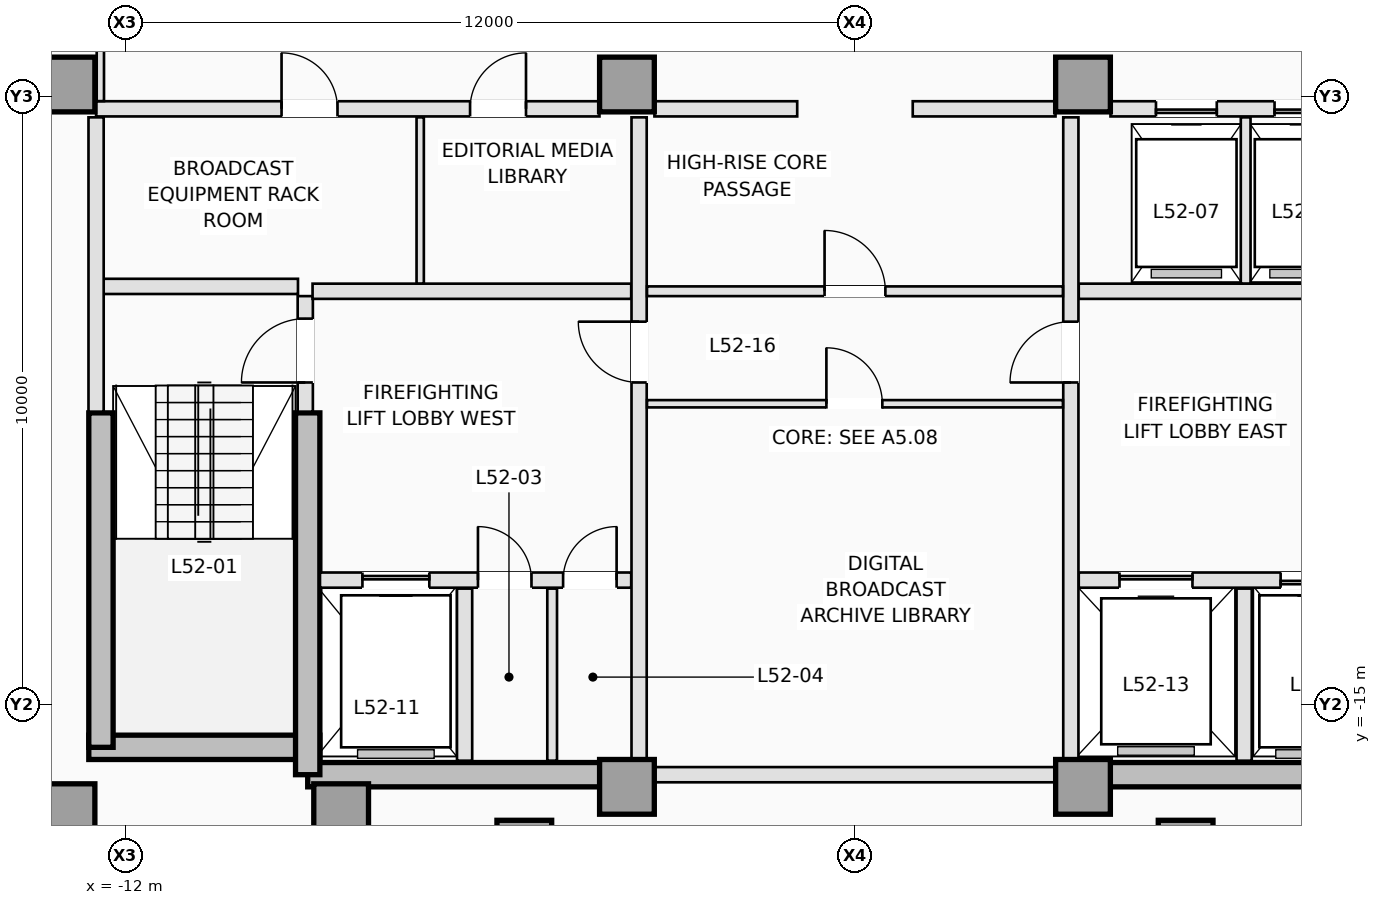
"""IFC4 building model, lengths in metres.
Left out: names, types, materials, properties, quantities, classifications, styles, units other than length and angle.
Written with IfcOpenShell. Run it as: python <this file> out.ifc"""

import sys

from ifc_helpers import new_model, si_unit, direction, frame, frame_2d, origin, origin_2d, place, context, subcontext, project, spatial, rectangle, extrude, element, fill, save


model = new_model("IFC4")
c1 = context("Model", 3, precision=1e-05, world=origin(), true_north=direction((0.0, 1.0)))
c2 = subcontext(c1, "Body", "Model", "MODEL_VIEW")
j1 = project(units=[si_unit("LENGTHUNIT", "METRE"), si_unit("PLANEANGLEUNIT", "RADIAN")], contexts=[c1])
p1 = place(None, origin())
s1 = spatial("IfcSite", under=j1, at=p1, CompositionType="ELEMENT")
p2 = place(p1, origin())
s2 = spatial("IfcBuilding", under=s1, at=p2, CompositionType="ELEMENT")
p3 = place(p2, frame((0.0, 0.0, 190.4)))
s3 = spatial("IfcBuildingStorey", under=s2, at=p3, CompositionType="ELEMENT", Elevation=190.4)
p4 = place(p3, frame((-12.6, -15.7, 0.0), z_axis=(0.0, 0.0, 1.0), x_axis=(1.0, 0.0, 0.0)))
e1 = element("IfcWall", 1, at=p4, inside=s3, PredefinedType="SHEAR", context=c2, shape_type="SweptSolid", body=[
    extrude(rectangle(XDim=3.8, YDim=0.4, at=frame_2d((1.9, 0.0))), origin(), (0.0, 0.0, 1.0), 3.5),
])
for number, where, z_axis, x_axis in (
    (2, (-9.0, -16.15, 0.0), (0.0, 0.0, 1.0), (1.0, 0.0, 0.0)),
    (3, (3.75, -16.15, 0.0), (0.0, 0.0, 1.0), (1.0, 0.0, 0.0)),
):
    element("IfcWall", number, at=place(p3, frame(where, z_axis=z_axis, x_axis=x_axis)), inside=s3, PredefinedType="SHEAR", context=c2, shape_type="SweptSolid", body=[
        extrude(rectangle(XDim=5.25, YDim=0.4, at=frame_2d((2.625, 0.0))), origin(), (0.0, 0.0, 1.0), 3.5),
    ])
p5 = place(p3, frame((-12.4, -15.7, 0.0), z_axis=(0.0, 0.0, 1.0), x_axis=(0.0, 1.0, 0.0)))
e4 = element("IfcWall", 4, at=p5, inside=s3, PredefinedType="SHEAR", context=c2, shape_type="SweptSolid", body=[
    extrude(rectangle(XDim=5.5, YDim=0.4, at=frame_2d((2.75, 0.0))), origin(), (0.0, 0.0, 1.0), 3.5),
])
p6 = place(p3, frame((-9.0, -16.15, 0.0), z_axis=(0.0, 0.0, 1.0), x_axis=(0.0, 1.0, 0.0)))
e5 = element("IfcWall", 5, at=p6, inside=s3, PredefinedType="SHEAR", context=c2, shape_type="SweptSolid", body=[
    extrude(rectangle(XDim=5.95, YDim=0.4, at=frame_2d((2.975, 0.0))), origin(), (0.0, 0.0, 1.0), 3.5),
])
for number, where, z_axis, x_axis in (
    (6, (-12.95, -16.75, 0.0), (0.0, 0.0, 1.0), (1.0, 0.0, 0.0)),
    (7, (-8.45, -16.75, 0.0), (0.0, 0.0, 1.0), (1.0, 0.0, 0.0)),
    (8, (-3.75, -16.35, 0.0), (0.0, 0.0, 1.0), (1.0, 0.0, 0.0)),
    (9, (3.75, -16.35, 0.0), (0.0, 0.0, 1.0), (1.0, 0.0, 0.0)),
    (10, (-12.95, -4.8, 0.0), (0.0, 0.0, 1.0), (1.0, 0.0, 0.0)),
    (11, (-3.75, -4.8, 0.0), (0.0, 0.0, 1.0), (1.0, 0.0, 0.0)),
    (12, (3.75, -4.8, 0.0), (0.0, 0.0, 1.0), (1.0, 0.0, 0.0)),
    (13, (-5.438, -17.35, 0.0), (0.0, 0.0, 1.0), (0.0, 1.0, 0.0)),
    (14, (5.438, -17.35, 0.0), (0.0, 0.0, 1.0), (0.0, 1.0, 0.0)),
):
    element("IfcColumn", number, at=place(p3, frame(where, z_axis=z_axis, x_axis=x_axis)), inside=s3, PredefinedType="COLUMN", context=c2, shape_type="SweptSolid", body=[
        extrude(rectangle(XDim=0.9, YDim=0.9, at=origin_2d()), origin(), (0.0, 0.0, 1.0), 3.5),
    ])
p7 = place(p3, frame((-9.04, -10.18, 0.0), z_axis=(0.0, 0.0, 1.0), x_axis=(0.0, 1.0, 0.0)))
e15 = element("IfcWall", 15, at=p7, inside=s3, PredefinedType="PARTITIONING", context=c2, shape_type="SweptSolid", body=[
    extrude(rectangle(XDim=1.9, YDim=0.25, at=frame_2d((0.95, 0.0))), origin(), (0.0, 0.0, 1.0), 3.25),
])
p8 = place(p7, frame((0.48, 0.0, 0.0)))
e16 = element("IfcOpeningElement", 16, at=p8, cuts=e15, PredefinedType="OPENING", context=c2, shape_type="SweptSolid", body=[
    extrude(rectangle(XDim=1.05, YDim=2.15, at=frame_2d((0.525, 1.075))), frame((0.0, 0.135, 0.0), z_axis=(0.0, -1.0, 0.0), x_axis=(1.0, 0.0, 0.0)), (0.0, 0.0, 1.0), 0.27),
])
p9 = place(p3, frame((-12.38, -8.12, 0.0), z_axis=(0.0, 0.0, 1.0), x_axis=(1.0, 0.0, 0.0)))
e17 = element("IfcWall", 17, at=p9, inside=s3, PredefinedType="PARTITIONING", context=c2, shape_type="SweptSolid", body=[
    extrude(rectangle(XDim=3.22, YDim=0.25, at=frame_2d((1.61, 0.0))), origin(), (0.0, 0.0, 1.0), 3.25),
])
p10 = place(p3, frame((-12.48, -10.18, 0.0), z_axis=(0.0, 0.0, 1.0), x_axis=(0.0, 1.0, 0.0)))
e18 = element("IfcWall", 18, at=p10, inside=s3, PredefinedType="PARTITIONING", context=c2, shape_type="SweptSolid", body=[
    extrude(rectangle(XDim=4.84, YDim=0.25, at=frame_2d((2.42, 0.0))), origin(), (0.0, 0.0, 1.0), 3.25),
])
p11 = place(p3, frame((-8.798, -12.95, 0.0), z_axis=(0.0, 0.0, 1.0), x_axis=(1.0, 0.0, 0.0)))
e19 = element("IfcWall", 19, at=p11, inside=s3, PredefinedType="PARTITIONING", context=c2, shape_type="SweptSolid", body=[
    extrude(rectangle(XDim=5.118, YDim=0.25, at=frame_2d((2.559, 0.0))), origin(), (0.0, 0.0, 1.0), 3.25),
])
p12 = place(p11, frame((0.698, 0.0, 0.0)))
e20 = element("IfcOpeningElement", 20, at=p12, cuts=e19, PredefinedType="OPENING", context=c2, shape_type="SweptSolid", body=[
    extrude(rectangle(XDim=1.1, YDim=2.15, at=frame_2d((0.55, 1.075))), frame((0.0, 0.135, 0.0), z_axis=(0.0, -1.0, 0.0), x_axis=(1.0, 0.0, 0.0)), (0.0, 0.0, 1.0), 0.27),
])
p13 = place(p11, frame((2.598, 0.0, 0.0)))
e21 = element("IfcOpeningElement", 21, at=p13, cuts=e19, PredefinedType="OPENING", context=c2, shape_type="SweptSolid", body=[
    extrude(rectangle(XDim=0.88, YDim=2.1, at=frame_2d((0.44, 1.05))), frame((0.0, 0.135, 0.0), z_axis=(0.0, -1.0, 0.0), x_axis=(1.0, 0.0, 0.0)), (0.0, 0.0, 1.0), 0.27),
])
p14 = place(p11, frame((3.998, 0.0, 0.0)))
e22 = element("IfcOpeningElement", 22, at=p14, cuts=e19, PredefinedType="OPENING", context=c2, shape_type="SweptSolid", body=[
    extrude(rectangle(XDim=0.88, YDim=2.1, at=frame_2d((0.44, 1.05))), frame((0.0, 0.135, 0.0), z_axis=(0.0, -1.0, 0.0), x_axis=(1.0, 0.0, 0.0)), (0.0, 0.0, 1.0), 0.27),
])
p15 = place(p3, frame((3.68, -12.95, 0.0), z_axis=(0.0, 0.0, 1.0), x_axis=(1.0, 0.0, 0.0)))
e23 = element("IfcWall", 23, at=p15, inside=s3, PredefinedType="PARTITIONING", context=c2, shape_type="SweptSolid", body=[
    extrude(rectangle(XDim=5.118, YDim=0.25, at=frame_2d((2.559, 0.0))), origin(), (0.0, 0.0, 1.0), 3.25),
])
p16 = place(p15, frame((3.32, 0.0, 0.0)))
e24 = element("IfcOpeningElement", 24, at=p16, cuts=e23, PredefinedType="OPENING", context=c2, shape_type="SweptSolid", body=[
    extrude(rectangle(XDim=1.1, YDim=2.15, at=frame_2d((0.55, 1.075))), frame((0.0, 0.135, 0.0), z_axis=(0.0, -1.0, 0.0), x_axis=(1.0, 0.0, 0.0)), (0.0, 0.0, 1.0), 0.27),
])
p17 = place(p15, frame((0.67, 0.0, 0.0)))
e25 = element("IfcOpeningElement", 25, at=p17, cuts=e23, PredefinedType="OPENING", context=c2, shape_type="SweptSolid", body=[
    extrude(rectangle(XDim=1.2, YDim=2.15, at=frame_2d((0.6, 1.075))), frame((0.0, 0.135, 0.0), z_axis=(0.0, -1.0, 0.0), x_axis=(1.0, 0.0, 0.0)), (0.0, 0.0, 1.0), 0.27),
])
p18 = place(p3, frame((-6.42, -15.92, 0.0), z_axis=(0.0, 0.0, 1.0), x_axis=(0.0, 1.0, 0.0)))
e26 = element("IfcWall", 26, at=p18, inside=s3, PredefinedType="PARTITIONING", context=c2, shape_type="SweptSolid", body=[
    extrude(rectangle(XDim=2.83, YDim=0.25, at=frame_2d((1.415, 0.0))), origin(), (0.0, 0.0, 1.0), 3.25),
])
p19 = place(p3, frame((-4.98, -15.92, 0.0), z_axis=(0.0, 0.0, 1.0), x_axis=(0.0, 1.0, 0.0)))
e27 = element("IfcWall", 27, at=p19, inside=s3, PredefinedType="PARTITIONING", context=c2, shape_type="SweptSolid", body=[
    extrude(rectangle(XDim=2.83, YDim=0.16, at=frame_2d((1.415, 0.0))), origin(), (0.0, 0.0, 1.0), 3.25),
])
p20 = place(p3, frame((6.4, -15.92, 0.0), z_axis=(0.0, 0.0, 1.0), x_axis=(0.0, 1.0, 0.0)))
e28 = element("IfcWall", 28, at=p20, inside=s3, PredefinedType="PARTITIONING", context=c2, shape_type="SweptSolid", body=[
    extrude(rectangle(XDim=2.83, YDim=0.25, at=frame_2d((1.415, 0.0))), origin(), (0.0, 0.0, 1.0), 3.25),
])
for number, where, z_axis, x_axis in (
    (29, (-8.92, -8.2, 0.0), (0.0, 0.0, 1.0), (1.0, 0.0, 0.0)),
    (30, (3.68, -8.2, 0.0), (0.0, 0.0, 1.0), (1.0, 0.0, 0.0)),
):
    element("IfcWall", number, at=place(p3, frame(where, z_axis=z_axis, x_axis=x_axis)), inside=s3, PredefinedType="PARTITIONING", context=c2, shape_type="SweptSolid", body=[
        extrude(rectangle(XDim=5.24, YDim=0.25, at=frame_2d((2.62, 0.0))), origin(), (0.0, 0.0, 1.0), 3.25),
    ])
p21 = place(p3, frame((-3.55, -15.898, 0.0), z_axis=(0.0, 0.0, 1.0), x_axis=(0.0, 1.0, 0.0)))
e31 = element("IfcWall", 31, at=p21, inside=s3, PredefinedType="PARTITIONING", context=c2, shape_type="SweptSolid", body=[
    extrude(rectangle(XDim=10.558, YDim=0.25, at=frame_2d((5.279, 0.0))), origin(), (0.0, 0.0, 1.0), 3.25),
])
p22 = place(p21, frame((6.198, 0.0, 0.0)))
e32 = element("IfcOpeningElement", 32, at=p22, cuts=e31, PredefinedType="OPENING", context=c2, shape_type="SweptSolid", body=[
    extrude(rectangle(XDim=1.0, YDim=2.15, at=frame_2d((0.5, 1.075))), frame((0.0, 0.135, 0.0), z_axis=(0.0, -1.0, 0.0), x_axis=(1.0, 0.0, 0.0)), (0.0, 0.0, 1.0), 0.27),
])
p23 = place(p3, frame((3.55, -15.898, 0.0), z_axis=(0.0, 0.0, 1.0), x_axis=(0.0, 1.0, 0.0)))
e33 = element("IfcWall", 33, at=p23, inside=s3, PredefinedType="PARTITIONING", context=c2, shape_type="SweptSolid", body=[
    extrude(rectangle(XDim=10.558, YDim=0.25, at=frame_2d((5.279, 0.0))), origin(), (0.0, 0.0, 1.0), 3.25),
])
p24 = place(p23, frame((6.198, 0.0, 0.0)))
e34 = element("IfcOpeningElement", 34, at=p24, cuts=e33, PredefinedType="OPENING", context=c2, shape_type="SweptSolid", body=[
    extrude(rectangle(XDim=1.0, YDim=2.15, at=frame_2d((0.5, 1.075))), frame((0.0, 0.135, 0.0), z_axis=(0.0, -1.0, 0.0), x_axis=(1.0, 0.0, 0.0)), (0.0, 0.0, 1.0), 0.27),
])
p25 = place(p3, frame((-12.48, -5.2, 0.0), z_axis=(0.0, 0.0, 1.0), x_axis=(1.0, 0.0, 0.0)))
e35 = element("IfcWall", 35, at=p25, inside=s3, PredefinedType="PARTITIONING", context=c2, shape_type="SweptSolid", body=[
    extrude(rectangle(XDim=8.278, YDim=0.25, at=frame_2d((4.139, 0.0))), origin(), (0.0, 0.0, 1.0), 3.25),
])
p26 = place(p25, frame((3.05, 0.0, 0.0)))
e36 = element("IfcOpeningElement", 36, at=p26, cuts=e35, PredefinedType="OPENING", context=c2, shape_type="SweptSolid", body=[
    extrude(rectangle(XDim=0.92, YDim=2.12, at=frame_2d((0.46, 1.06))), frame((0.0, 0.135, 0.0), z_axis=(0.0, -1.0, 0.0), x_axis=(1.0, 0.0, 0.0)), (0.0, 0.0, 1.0), 0.27),
])
p27 = place(p25, frame((6.15, 0.0, 0.0)))
e37 = element("IfcOpeningElement", 37, at=p27, cuts=e35, PredefinedType="OPENING", context=c2, shape_type="SweptSolid", body=[
    extrude(rectangle(XDim=0.92, YDim=2.12, at=frame_2d((0.46, 1.06))), frame((0.0, 0.135, 0.0), z_axis=(0.0, -1.0, 0.0), x_axis=(1.0, 0.0, 0.0)), (0.0, 0.0, 1.0), 0.27),
])
p28 = place(p3, frame((4.202, -5.2, 0.0), z_axis=(0.0, 0.0, 1.0), x_axis=(1.0, 0.0, 0.0)))
e38 = element("IfcWall", 38, at=p28, inside=s3, PredefinedType="PARTITIONING", context=c2, shape_type="SweptSolid", body=[
    extrude(rectangle(XDim=8.278, YDim=0.25, at=frame_2d((4.139, 0.0))), origin(), (0.0, 0.0, 1.0), 3.25),
])
p29 = place(p28, frame((0.748, 0.0, 0.0)))
e39 = element("IfcOpeningElement", 39, at=p29, cuts=e38, PredefinedType="OPENING", context=c2, shape_type="SweptSolid", body=[
    extrude(rectangle(XDim=1.0, YDim=2.15, at=frame_2d((0.5, 1.075))), frame((0.0, 0.135, 0.0), z_axis=(0.0, -1.0, 0.0), x_axis=(1.0, 0.0, 0.0)), (0.0, 0.0, 1.0), 0.27),
])
p30 = place(p28, frame((2.698, 0.0, 0.0)))
e40 = element("IfcOpeningElement", 40, at=p30, cuts=e38, PredefinedType="OPENING", context=c2, shape_type="SweptSolid", body=[
    extrude(rectangle(XDim=1.0, YDim=2.15, at=frame_2d((0.5, 1.075))), frame((0.0, 0.135, 0.0), z_axis=(0.0, -1.0, 0.0), x_axis=(1.0, 0.0, 0.0)), (0.0, 0.0, 1.0), 0.27),
])
p31 = place(p28, frame((4.648, 0.0, 0.0)))
e41 = element("IfcOpeningElement", 41, at=p31, cuts=e38, PredefinedType="OPENING", context=c2, shape_type="SweptSolid", body=[
    extrude(rectangle(XDim=1.0, YDim=2.15, at=frame_2d((0.5, 1.075))), frame((0.0, 0.135, 0.0), z_axis=(0.0, -1.0, 0.0), x_axis=(1.0, 0.0, 0.0)), (0.0, 0.0, 1.0), 0.27),
])
p32 = place(p28, frame((6.598, 0.0, 0.0)))
e42 = element("IfcOpeningElement", 42, at=p32, cuts=e38, PredefinedType="OPENING", context=c2, shape_type="SweptSolid", body=[
    extrude(rectangle(XDim=1.0, YDim=2.15, at=frame_2d((0.5, 1.075))), frame((0.0, 0.135, 0.0), z_axis=(0.0, -1.0, 0.0), x_axis=(1.0, 0.0, 0.0)), (0.0, 0.0, 1.0), 0.27),
])
for number, where, z_axis, x_axis in (
    (43, (-3.298, -5.2, 0.0), (0.0, 0.0, 1.0), (1.0, 0.0, 0.0)),
    (44, (0.95, -5.2, 0.0), (0.0, 0.0, 1.0), (1.0, 0.0, 0.0)),
):
    element("IfcWall", number, at=place(p3, frame(where, z_axis=z_axis, x_axis=x_axis)), inside=s3, PredefinedType="PARTITIONING", context=c2, shape_type="SweptSolid", body=[
        extrude(rectangle(XDim=2.348, YDim=0.25, at=frame_2d((1.174, 0.0))), origin(), (0.0, 0.0, 1.0), 3.25),
    ])
p33 = place(p3, frame((-7.15, -8.073, 0.0), z_axis=(0.0, 0.0, 1.0), x_axis=(0.0, 1.0, 0.0)))
e45 = element("IfcWall", 45, at=p33, inside=s3, PredefinedType="PARTITIONING", context=c2, shape_type="SweptSolid", body=[
    extrude(rectangle(XDim=2.733, YDim=0.12, at=frame_2d((1.366, 0.0))), origin(), (0.0, 0.0, 1.0), 3.25),
])
p34 = place(p3, frame((6.425, -8.073, 0.0), z_axis=(0.0, 0.0, 1.0), x_axis=(0.0, 1.0, 0.0)))
e46 = element("IfcWall", 46, at=p34, inside=s3, PredefinedType="PARTITIONING", context=c2, shape_type="SweptSolid", body=[
    extrude(rectangle(XDim=2.733, YDim=0.16, at=frame_2d((1.366, 0.0))), origin(), (0.0, 0.0, 1.0), 3.25),
])
p35 = place(p3, frame((-3.298, -16.15, 0.0), z_axis=(0.0, 0.0, 1.0), x_axis=(1.0, 0.0, 0.0)))
e47 = element("IfcWall", 47, at=p35, inside=s3, PredefinedType="PARTITIONING", context=c2, shape_type="SweptSolid", body=[
    extrude(rectangle(XDim=6.596, YDim=0.25, at=frame_2d((3.298, 0.0))), origin(), (0.0, 0.0, 1.0), 2.45),
])
p36 = place(p3, frame((-3.42, -8.2, 0.0), z_axis=(0.0, 0.0, 1.0), x_axis=(1.0, 0.0, 0.0)))
e48 = element("IfcWall", 48, at=p36, inside=s3, PredefinedType="PARTITIONING", context=c2, shape_type="SweptSolid", body=[
    extrude(rectangle(XDim=6.84, YDim=0.16, at=frame_2d((3.42, 0.0))), origin(), (0.0, 0.0, 1.0), 3.25),
])
p37 = place(p36, frame((2.92, 0.0, 0.0)))
e49 = element("IfcOpeningElement", 49, at=p37, cuts=e48, PredefinedType="OPENING", context=c2, shape_type="SweptSolid", body=[
    extrude(rectangle(XDim=1.0, YDim=2.15, at=frame_2d((0.5, 1.075))), frame((0.0, 0.09, 0.0), z_axis=(0.0, -1.0, 0.0), x_axis=(1.0, 0.0, 0.0)), (0.0, 0.0, 1.0), 0.18),
])
p38 = place(p3, frame((-3.42, -10.05, 0.0), z_axis=(0.0, 0.0, 1.0), x_axis=(1.0, 0.0, 0.0)))
e50 = element("IfcWall", 50, at=p38, inside=s3, PredefinedType="PARTITIONING", context=c2, shape_type="SweptSolid", body=[
    extrude(rectangle(XDim=6.84, YDim=0.12, at=frame_2d((3.42, 0.0))), origin(), (0.0, 0.0, 1.0), 3.25),
])
p39 = place(p38, frame((2.95, 0.0, 0.0)))
e51 = element("IfcOpeningElement", 51, at=p39, cuts=e50, PredefinedType="OPENING", context=c2, shape_type="SweptSolid", body=[
    extrude(rectangle(XDim=0.92, YDim=2.12, at=frame_2d((0.46, 1.06))), frame((0.0, 0.07, 0.0), z_axis=(0.0, -1.0, 0.0), x_axis=(1.0, 0.0, 0.0)), (0.0, 0.0, 1.0), 0.14),
])
p40 = place(p3, frame((-12.41, -5.073, 0.0), z_axis=(0.0, 0.0, 1.0), x_axis=(0.0, 1.0, 0.0)))
e52 = element("IfcWall", 52, at=p40, inside=s3, PredefinedType="PARTITIONING", context=c2, shape_type="SweptSolid", body=[
    extrude(rectangle(XDim=2.673, YDim=0.12, at=frame_2d((1.336, 0.0))), origin(), (0.0, 0.0, 1.0), 3.25),
])
p41 = place(p29, origin())
e53 = element("IfcDoor", 53, at=p41, inside=s3, OperationType="SLIDING_TO_RIGHT", PredefinedType="DOOR", context=c2, shape_type="SweptSolid", body=[
    extrude(rectangle(XDim=1.0, YDim=2.15, at=frame_2d((0.5, 1.075))), frame((0.0, 0.025, 0.0), z_axis=(0.0, -1.0, 0.0), x_axis=(1.0, 0.0, 0.0)), (0.0, 0.0, 1.0), 0.05),
])
fill(e39, e53)
p42 = place(p30, origin())
e54 = element("IfcDoor", 54, at=p42, inside=s3, OperationType="SLIDING_TO_RIGHT", PredefinedType="DOOR", context=c2, shape_type="SweptSolid", body=[
    extrude(rectangle(XDim=1.0, YDim=2.15, at=frame_2d((0.5, 1.075))), frame((0.0, 0.025, 0.0), z_axis=(0.0, -1.0, 0.0), x_axis=(1.0, 0.0, 0.0)), (0.0, 0.0, 1.0), 0.05),
])
fill(e40, e54)
p43 = place(p12, origin())
e55 = element("IfcDoor", 55, at=p43, inside=s3, OperationType="SLIDING_TO_LEFT", PredefinedType="DOOR", context=c2, shape_type="SweptSolid", body=[
    extrude(rectangle(XDim=1.1, YDim=2.15, at=frame_2d((0.55, 1.075))), frame((0.0, 0.025, 0.0), z_axis=(0.0, -1.0, 0.0), x_axis=(1.0, 0.0, 0.0)), (0.0, 0.0, 1.0), 0.05),
])
fill(e20, e55)
p44 = place(p16, origin())
e56 = element("IfcDoor", 56, at=p44, inside=s3, OperationType="SLIDING_TO_RIGHT", PredefinedType="DOOR", context=c2, shape_type="SweptSolid", body=[
    extrude(rectangle(XDim=1.1, YDim=2.15, at=frame_2d((0.55, 1.075))), frame((0.0, 0.025, 0.0), z_axis=(0.0, -1.0, 0.0), x_axis=(1.0, 0.0, 0.0)), (0.0, 0.0, 1.0), 0.05),
])
fill(e24, e56)
p45 = place(p17, origin())
e57 = element("IfcDoor", 57, at=p45, inside=s3, OperationType="SLIDING_TO_LEFT", PredefinedType="DOOR", context=c2, shape_type="SweptSolid", body=[
    extrude(rectangle(XDim=1.2, YDim=2.15, at=frame_2d((0.6, 1.075))), frame((0.0, 0.025, 0.0), z_axis=(0.0, -1.0, 0.0), x_axis=(1.0, 0.0, 0.0)), (0.0, 0.0, 1.0), 0.05),
])
fill(e25, e57)
p46 = place(p8, origin())
e58 = element("IfcDoor", 58, at=p46, inside=s3, OperationType="SINGLE_SWING_LEFT", PredefinedType="DOOR", context=c2, shape_type="SweptSolid", body=[
    extrude(rectangle(XDim=1.05, YDim=2.15, at=frame_2d((0.525, 1.075))), frame((0.0, 0.025, 0.0), z_axis=(0.0, -1.0, 0.0), x_axis=(1.0, 0.0, 0.0)), (0.0, 0.0, 1.0), 0.05),
])
fill(e16, e58)
p47 = place(p13, origin())
e59 = element("IfcDoor", 59, at=p47, inside=s3, OperationType="SINGLE_SWING_LEFT", PredefinedType="TRAPDOOR", context=c2, shape_type="SweptSolid", body=[
    extrude(rectangle(XDim=0.88, YDim=2.1, at=frame_2d((0.44, 1.05))), frame((0.0, 0.025, 0.0), z_axis=(0.0, -1.0, 0.0), x_axis=(1.0, 0.0, 0.0)), (0.0, 0.0, 1.0), 0.05),
])
fill(e21, e59)
p48 = place(p14, origin())
e60 = element("IfcDoor", 60, at=p48, inside=s3, OperationType="SINGLE_SWING_RIGHT", PredefinedType="TRAPDOOR", context=c2, shape_type="SweptSolid", body=[
    extrude(rectangle(XDim=0.88, YDim=2.1, at=frame_2d((0.44, 1.05))), frame((0.0, 0.025, 0.0), z_axis=(0.0, -1.0, 0.0), x_axis=(1.0, 0.0, 0.0)), (0.0, 0.0, 1.0), 0.05),
])
fill(e22, e60)
p49 = place(p22, origin())
e61 = element("IfcDoor", 61, at=p49, inside=s3, OperationType="SINGLE_SWING_RIGHT", PredefinedType="DOOR", context=c2, shape_type="SweptSolid", body=[
    extrude(rectangle(XDim=1.0, YDim=2.15, at=frame_2d((0.5, 1.075))), frame((0.0, 0.025, 0.0), z_axis=(0.0, -1.0, 0.0), x_axis=(1.0, 0.0, 0.0)), (0.0, 0.0, 1.0), 0.05),
])
fill(e32, e61)
p50 = place(p24, origin())
e62 = element("IfcDoor", 62, at=p50, inside=s3, OperationType="SINGLE_SWING_LEFT", PredefinedType="DOOR", context=c2, shape_type="SweptSolid", body=[
    extrude(rectangle(XDim=1.0, YDim=2.15, at=frame_2d((0.5, 1.075))), frame((0.0, 0.025, 0.0), z_axis=(0.0, -1.0, 0.0), x_axis=(1.0, 0.0, 0.0)), (0.0, 0.0, 1.0), 0.05),
])
fill(e34, e62)
p51 = place(p26, origin())
e63 = element("IfcDoor", 63, at=p51, inside=s3, OperationType="SINGLE_SWING_LEFT", PredefinedType="DOOR", context=c2, shape_type="SweptSolid", body=[
    extrude(rectangle(XDim=0.92, YDim=2.12, at=frame_2d((0.46, 1.06))), frame((0.0, 0.025, 0.0), z_axis=(0.0, -1.0, 0.0), x_axis=(1.0, 0.0, 0.0)), (0.0, 0.0, 1.0), 0.05),
])
fill(e36, e63)
p52 = place(p27, origin())
e64 = element("IfcDoor", 64, at=p52, inside=s3, OperationType="SINGLE_SWING_RIGHT", PredefinedType="DOOR", context=c2, shape_type="SweptSolid", body=[
    extrude(rectangle(XDim=0.92, YDim=2.12, at=frame_2d((0.46, 1.06))), frame((0.0, 0.025, 0.0), z_axis=(0.0, -1.0, 0.0), x_axis=(1.0, 0.0, 0.0)), (0.0, 0.0, 1.0), 0.05),
])
fill(e37, e64)
p53 = place(p37, origin())
e65 = element("IfcDoor", 65, at=p53, inside=s3, OperationType="SINGLE_SWING_LEFT", PredefinedType="DOOR", context=c2, shape_type="SweptSolid", body=[
    extrude(rectangle(XDim=1.0, YDim=2.15, at=frame_2d((0.5, 1.075))), frame((0.0, 0.025, 0.0), z_axis=(0.0, -1.0, 0.0), x_axis=(1.0, 0.0, 0.0)), (0.0, 0.0, 1.0), 0.05),
])
fill(e49, e65)
p54 = place(p39, origin())
e66 = element("IfcDoor", 66, at=p54, inside=s3, OperationType="SINGLE_SWING_LEFT", PredefinedType="DOOR", context=c2, shape_type="SweptSolid", body=[
    extrude(rectangle(XDim=0.92, YDim=2.12, at=frame_2d((0.46, 1.06))), frame((0.0, 0.025, 0.0), z_axis=(0.0, -1.0, 0.0), x_axis=(1.0, 0.0, 0.0)), (0.0, 0.0, 1.0), 0.05),
])
fill(e51, e66)
save(model, sys.argv[1])
